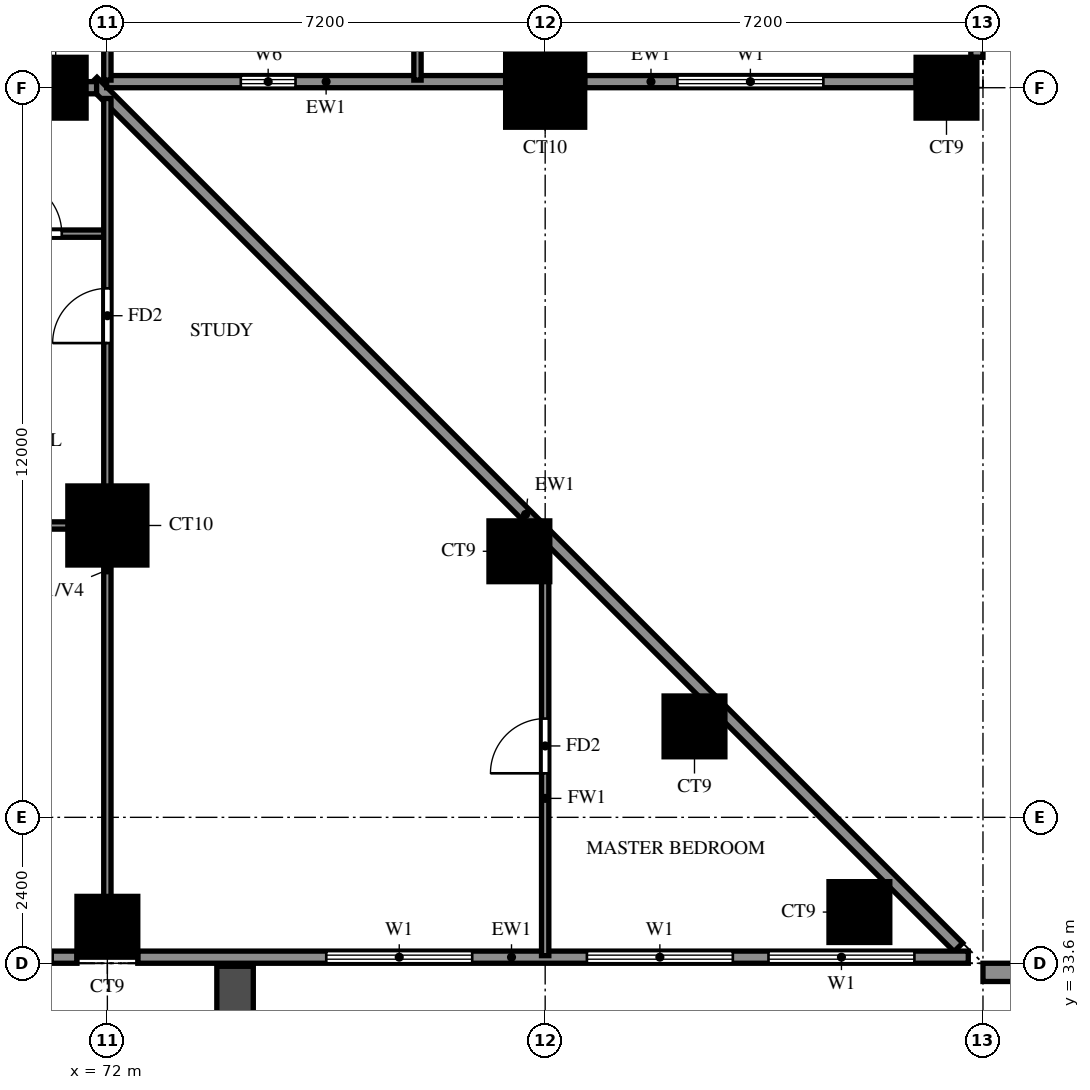
"""IFC4 building model, lengths in metres.
Left out: names, types, materials, properties, quantities, classifications, styles, units other than length and angle.
Written with IfcOpenShell. Run it as: python <this file> out.ifc"""

import sys

from ifc_helpers import new_model, si_unit, direction, frame, frame_2d, origin, origin_2d, place, context, subcontext, project, spatial, rectangle, extrude, source, transform, mapped, element, fill, save


model = new_model("IFC4")
c1 = context("Model", 3, precision=1e-05, world=origin(), true_north=direction((0.0, 1.0)))
c2 = subcontext(c1, "Body", "Model", "MODEL_VIEW")
j1 = project(units=[si_unit("LENGTHUNIT", "METRE"), si_unit("PLANEANGLEUNIT", "RADIAN")], contexts=[c1])
p1 = place(None, origin())
s1 = spatial("IfcSite", under=j1, at=p1, CompositionType="ELEMENT")
p2 = place(p1, origin())
s2 = spatial("IfcBuilding", under=s1, at=p2, CompositionType="ELEMENT")
p3 = place(p2, frame((0.0, 0.0, 90.0)))
s3 = spatial("IfcBuildingStorey", under=s2, at=p3, CompositionType="ELEMENT", Elevation=90.0)
m1 = source(origin(), c2, "Body", "SweptSolid", [
    extrude(rectangle(XDim=1.0, YDim=1.0, at=origin_2d()), origin(), (0.0, 0.0, 1.0), 3.18),
])
for number, where, z_axis, x_axis in (
    (1, (72.0, 34.2, 0.0), (0.0, 0.0, 1.0), (1.0, 0.0, 0.0)),
    (2, (84.367, 34.442, 0.0), (0.0, 0.0, 1.0), (1.0, 0.0, 0.0)),
    (3, (81.656, 37.496, 0.0), (0.0, 0.0, 1.0), (1.0, 0.0, 0.0)),
    (4, (78.776, 40.376, 0.0), (0.0, 0.0, 1.0), (1.0, 0.0, 0.0)),
):
    element("IfcColumn", number, at=place(p3, frame(where, z_axis=z_axis, x_axis=x_axis)), inside=s3, PredefinedType="COLUMN", context=c2, shape_type="MappedRepresentation", body=[
        mapped(m1, transform((0.0, 0.0, 0.0))),
    ])
m2 = source(origin(), c2, "Body", "SweptSolid", [
    extrude(rectangle(XDim=1.3, YDim=1.3, at=origin_2d()), origin(), (0.0, 0.0, 1.0), 3.18),
])
p4 = place(p3, frame((72.0, 40.8, 0.0), z_axis=(0.0, 0.0, 1.0), x_axis=(1.0, 0.0, 0.0)))
e5 = element("IfcColumn", 5, at=p4, inside=s3, PredefinedType="COLUMN", context=c2, shape_type="MappedRepresentation", body=[
    mapped(m2, transform((0.0, 0.0, 0.0))),
])
p5 = place(p3, frame((71.15, 48.0, 0.0), z_axis=(0.0, 0.0, 1.0), x_axis=(1.0, 0.0, 0.0)))
e6 = element("IfcColumn", 6, at=p5, inside=s3, PredefinedType="COLUMN", context=c2, shape_type="MappedRepresentation", body=[
    mapped(m1, transform((0.0, 0.0, 0.0))),
])
p6 = place(p3, frame((79.2, 48.0, 0.0), z_axis=(0.0, 0.0, 1.0), x_axis=(1.0, 0.0, 0.0)))
e7 = element("IfcColumn", 7, at=p6, inside=s3, PredefinedType="COLUMN", context=c2, shape_type="MappedRepresentation", body=[
    mapped(m2, transform((0.0, 0.0, 0.0))),
])
p7 = place(p3, frame((85.8, 48.0, 0.0), z_axis=(0.0, 0.0, 1.0), x_axis=(1.0, 0.0, 0.0)))
e8 = element("IfcColumn", 8, at=p7, inside=s3, PredefinedType="COLUMN", context=c2, shape_type="MappedRepresentation", body=[
    mapped(m1, transform((0.0, 0.0, 0.0))),
])
p8 = place(p3, frame((85.996, 33.863, 0.0), z_axis=(0.0, 0.0, 1.0), x_axis=(-0.707100718496, 0.707112843825, 0.0)))
e9 = element("IfcWall", 9, at=p8, inside=s3, PredefinedType="SOLIDWALL", context=c2, shape_type="SweptSolid", body=[
    extrude(rectangle(XDim=20.135, YDim=0.2, at=frame_2d((10.067, 0.0))), origin(), (0.0, 0.0, 1.0), 3.18),
])
p9 = place(p3, frame((71.989, 48.1, 0.0), z_axis=(0.0, 0.0, 1.0), x_axis=(1.0, 0.0, 0.0)))
e10 = element("IfcWall", 10, at=p9, inside=s3, PredefinedType="SOLIDWALL", context=c2, shape_type="SweptSolid", body=[
    extrude(rectangle(XDim=6.562, YDim=0.2, at=frame_2d((3.281, 0.0))), origin(), (0.0, 0.0, 1.0), 3.18),
])
p10 = place(p9, frame((2.206, 0.0, 1.5)))
e11 = element("IfcOpeningElement", 11, at=p10, cuts=e10, PredefinedType="OPENING", context=c2, shape_type="SweptSolid", body=[
    extrude(rectangle(XDim=0.9, YDim=0.9, at=frame_2d((0.45, 0.45))), frame((0.0, 0.11, 0.0), z_axis=(0.0, -1.0, 0.0), x_axis=(1.0, 0.0, 0.0)), (0.0, 0.0, 1.0), 0.22),
])
p11 = place(p3, frame((79.85, 48.1, 0.0), z_axis=(0.0, 0.0, 1.0), x_axis=(1.0, 0.0, 0.0)))
e12 = element("IfcWall", 12, at=p11, inside=s3, PredefinedType="SOLIDWALL", context=c2, shape_type="SweptSolid", body=[
    extrude(rectangle(XDim=5.45, YDim=0.2, at=frame_2d((2.725, 0.0))), origin(), (0.0, 0.0, 1.0), 3.18),
])
p12 = place(p11, frame((1.525, 0.0, 0.6)))
e13 = element("IfcOpeningElement", 13, at=p12, cuts=e12, PredefinedType="OPENING", context=c2, shape_type="SweptSolid", body=[
    extrude(rectangle(XDim=2.4, YDim=2.4, at=frame_2d((1.2, 1.2))), frame((0.0, 0.11, 0.0), z_axis=(0.0, -1.0, 0.0), x_axis=(1.0, 0.0, 0.0)), (0.0, 0.0, 1.0), 0.22),
])
p13 = place(p3, frame((86.3, 48.5, 0.0), z_axis=(0.0, 0.0, 1.0), x_axis=(0.0, 1.0, 0.0)))
e14 = element("IfcWall", 14, at=p13, inside=s3, PredefinedType="SOLIDWALL", context=c2, shape_type="SweptSolid", body=[
    extrude(rectangle(XDim=6.2, YDim=0.2, at=frame_2d((3.1, 0.0))), origin(), (0.0, 0.0, 1.0), 3.18),
])
p14 = place(p13, frame((1.05, 0.0, 0.6)))
e15 = element("IfcOpeningElement", 15, at=p14, cuts=e14, PredefinedType="OPENING", context=c2, shape_type="SweptSolid", body=[
    extrude(rectangle(XDim=2.4, YDim=2.4, at=frame_2d((1.2, 1.2))), frame((0.0, 0.11, 0.0), z_axis=(0.0, -1.0, 0.0), x_axis=(1.0, 0.0, 0.0)), (0.0, 0.0, 1.0), 0.22),
])
p15 = place(p13, frame((5.0, 0.0, 0.6)))
e16 = element("IfcOpeningElement", 16, at=p15, cuts=e14, PredefinedType="OPENING", context=c2, shape_type="SweptSolid", body=[
    extrude(rectangle(XDim=0.9, YDim=2.4, at=frame_2d((0.45, 1.2))), frame((0.0, 0.11, 0.0), z_axis=(0.0, -1.0, 0.0), x_axis=(1.0, 0.0, 0.0)), (0.0, 0.0, 1.0), 0.22),
])
p16 = place(p3, frame((65.3, 33.7, 0.0), z_axis=(0.0, 0.0, 1.0), x_axis=(1.0, 0.0, 0.0)))
e17 = element("IfcWall", 17, at=p16, inside=s3, PredefinedType="SOLIDWALL", context=c2, shape_type="SweptSolid", body=[
    extrude(rectangle(XDim=6.2, YDim=0.2, at=frame_2d((3.1, 0.0))), origin(), (0.0, 0.0, 1.0), 3.18),
])
p17 = place(p16, frame((4.0, 0.0, 0.0)))
e18 = element("IfcOpeningElement", 18, at=p17, cuts=e17, PredefinedType="OPENING", context=c2, shape_type="SweptSolid", body=[
    extrude(rectangle(XDim=1.8, YDim=2.4, at=frame_2d((0.9, 1.2))), frame((0.0, 0.11, 0.0), z_axis=(0.0, -1.0, 0.0), x_axis=(1.0, 0.0, 0.0)), (0.0, 0.0, 1.0), 0.22),
])
p18 = place(p16, frame((0.45, 0.0, 0.6)))
e19 = element("IfcOpeningElement", 19, at=p18, cuts=e17, PredefinedType="OPENING", context=c2, shape_type="SweptSolid", body=[
    extrude(rectangle(XDim=1.2, YDim=2.4, at=frame_2d((0.6, 1.2))), frame((0.0, 0.11, 0.0), z_axis=(0.0, -1.0, 0.0), x_axis=(1.0, 0.0, 0.0)), (0.0, 0.0, 1.0), 0.22),
])
p19 = place(p16, frame((2.65, 0.0, 0.6)))
e20 = element("IfcOpeningElement", 20, at=p19, cuts=e17, PredefinedType="OPENING", context=c2, shape_type="SweptSolid", body=[
    extrude(rectangle(XDim=0.9, YDim=2.4, at=frame_2d((0.45, 1.2))), frame((0.0, 0.11, 0.0), z_axis=(0.0, -1.0, 0.0), x_axis=(1.0, 0.0, 0.0)), (0.0, 0.0, 1.0), 0.22),
])
p20 = place(p3, frame((72.5, 33.7, 0.0), z_axis=(0.0, 0.0, 1.0), x_axis=(1.0, 0.0, 0.0)))
e21 = element("IfcWall", 21, at=p20, inside=s3, PredefinedType="SOLIDWALL", context=c2, shape_type="SweptSolid", body=[
    extrude(rectangle(XDim=13.659, YDim=0.2, at=frame_2d((6.829, 0.0))), origin(), (0.0, 0.0, 1.0), 3.18),
])
p21 = place(p20, frame((3.1, 0.0, 0.6)))
e22 = element("IfcOpeningElement", 22, at=p21, cuts=e21, PredefinedType="OPENING", context=c2, shape_type="SweptSolid", body=[
    extrude(rectangle(XDim=2.4, YDim=2.4, at=frame_2d((1.2, 1.2))), frame((0.0, 0.11, 0.0), z_axis=(0.0, -1.0, 0.0), x_axis=(1.0, 0.0, 0.0)), (0.0, 0.0, 1.0), 0.22),
])
p22 = place(p20, frame((7.386, 0.0, 0.6)))
e23 = element("IfcOpeningElement", 23, at=p22, cuts=e21, PredefinedType="OPENING", context=c2, shape_type="SweptSolid", body=[
    extrude(rectangle(XDim=2.4, YDim=2.4, at=frame_2d((1.2, 1.2))), frame((0.0, 0.11, 0.0), z_axis=(0.0, -1.0, 0.0), x_axis=(1.0, 0.0, 0.0)), (0.0, 0.0, 1.0), 0.22),
])
p23 = place(p20, frame((10.372, 0.0, 0.6)))
e24 = element("IfcOpeningElement", 24, at=p23, cuts=e21, PredefinedType="OPENING", context=c2, shape_type="SweptSolid", body=[
    extrude(rectangle(XDim=2.4, YDim=2.4, at=frame_2d((1.2, 1.2))), frame((0.0, 0.11, 0.0), z_axis=(0.0, -1.0, 0.0), x_axis=(1.0, 0.0, 0.0)), (0.0, 0.0, 1.0), 0.22),
])
p24 = place(p3, frame((86.4, 33.45, -0.32), z_axis=(0.0, 0.0, 1.0), x_axis=(1.0, 0.0, 0.0)))
e25 = element("IfcWall", 25, at=p24, inside=s3, PredefinedType="SOLIDWALL", context=c2, shape_type="SweptSolid", body=[
    extrude(rectangle(XDim=2.4, YDim=0.3, at=frame_2d((1.2, 0.0))), origin(), (0.0, 0.0, 1.0), 3.5),
])
p25 = place(p3, frame((74.1, 33.55, 0.0), z_axis=(0.0, 0.0, 1.0), x_axis=(0.0, -1.0, 0.0)))
e26 = element("IfcWall", 26, at=p25, inside=s3, PredefinedType="SOLIDWALL", context=c2, shape_type="SweptSolid", body=[
    extrude(rectangle(XDim=2.65, YDim=0.6, at=frame_2d((1.325, 0.0))), origin(), (0.0, 0.0, 1.0), 2.85),
])
p26 = place(p3, frame((67.2, 48.0, 0.0), z_axis=(0.0, 0.0, 1.0), x_axis=(1.0, 0.0, 0.0)))
e27 = element("IfcWall", 27, at=p26, inside=s3, PredefinedType="SOLIDWALL", context=c2, shape_type="SweptSolid", body=[
    extrude(rectangle(XDim=4.623, YDim=0.2, at=frame_2d((2.312, 0.0))), origin(), (0.0, 0.0, 1.0), 3.18),
])
p27 = place(p3, frame((60.0, 40.8, 0.0), z_axis=(0.0, 0.0, 1.0), x_axis=(1.0, 0.0, 0.0)))
e28 = element("IfcWall", 28, at=p27, inside=s3, PredefinedType="PARTITIONING", context=c2, shape_type="SweptSolid", body=[
    extrude(rectangle(XDim=12.0, YDim=0.12, at=frame_2d((6.0, 0.0))), origin(), (0.0, 0.0, 1.0), 3.18),
])
p28 = place(p27, frame((7.65, 0.0, 0.0)))
e29 = element("IfcOpeningElement", 29, at=p28, cuts=e28, PredefinedType="OPENING", context=c2, shape_type="SweptSolid", body=[
    extrude(rectangle(XDim=1.5, YDim=2.1, at=frame_2d((0.75, 1.05))), frame((0.0, 0.07, 0.0), z_axis=(0.0, -1.0, 0.0), x_axis=(1.0, 0.0, 0.0)), (0.0, 0.0, 1.0), 0.14),
])
p29 = place(p27, frame((1.95, 0.0, 0.0)))
e30 = element("IfcOpeningElement", 30, at=p29, cuts=e28, PredefinedType="OPENING", context=c2, shape_type="SweptSolid", body=[
    extrude(rectangle(XDim=0.9, YDim=2.1, at=frame_2d((0.45, 1.05))), frame((0.0, 0.07, 0.0), z_axis=(0.0, -1.0, 0.0), x_axis=(1.0, 0.0, 0.0)), (0.0, 0.0, 1.0), 0.14),
])
p30 = place(p3, frame((67.2, 45.6, 0.0), z_axis=(0.0, 0.0, 1.0), x_axis=(1.0, 0.0, 0.0)))
e31 = element("IfcWall", 31, at=p30, inside=s3, PredefinedType="PARTITIONING", context=c2, shape_type="SweptSolid", body=[
    extrude(rectangle(XDim=4.8, YDim=0.12, at=frame_2d((2.4, 0.0))), origin(), (0.0, 0.0, 1.0), 3.18),
])
p31 = place(p30, frame((3.15, 0.0, 0.0)))
e32 = element("IfcOpeningElement", 32, at=p31, cuts=e31, PredefinedType="OPENING", context=c2, shape_type="SweptSolid", body=[
    extrude(rectangle(XDim=0.9, YDim=2.1, at=frame_2d((0.45, 1.05))), frame((0.0, 0.07, 0.0), z_axis=(0.0, -1.0, 0.0), x_axis=(1.0, 0.0, 0.0)), (0.0, 0.0, 1.0), 0.14),
])
p32 = place(p3, frame((72.0, 33.725, 0.0), z_axis=(0.0, 0.0, 1.0), x_axis=(0.0, 1.0, 0.0)))
e33 = element("IfcWall", 33, at=p32, inside=s3, PredefinedType="PARTITIONING", context=c2, shape_type="SweptSolid", body=[
    extrude(rectangle(XDim=14.098, YDim=0.12, at=frame_2d((7.049, 0.0))), origin(), (0.0, 0.0, 1.0), 2.28),
])
p33 = place(p32, frame((10.075, 0.0, 0.0)))
e34 = element("IfcOpeningElement", 34, at=p33, cuts=e33, PredefinedType="OPENING", context=c2, shape_type="SweptSolid", body=[
    extrude(rectangle(XDim=0.9, YDim=2.1, at=frame_2d((0.45, 1.05))), frame((0.0, 0.07, 0.0), z_axis=(0.0, -1.0, 0.0), x_axis=(1.0, 0.0, 0.0)), (0.0, 0.0, 1.0), 0.14),
])
for number, where, z_axis, x_axis in (
    (35, (72.0, 48.125, 0.0), (0.0, 0.0, 1.0), (0.0, 1.0, 0.0)),
    (36, (77.1, 48.125, 0.0), (0.0, 0.0, 1.0), (0.0, 1.0, 0.0)),
):
    element("IfcWall", number, at=place(p3, frame(where, z_axis=z_axis, x_axis=x_axis)), inside=s3, PredefinedType="PARTITIONING", context=c2, shape_type="SweptSolid", body=[
        extrude(rectangle(XDim=3.475, YDim=0.12, at=frame_2d((1.738, 0.0))), origin(), (0.0, 0.0, 1.0), 3.18),
    ])
p34 = place(p3, frame((79.2, 33.725, 0.0), z_axis=(0.0, 0.0, 1.0), x_axis=(0.0, 1.0, 0.0)))
e37 = element("IfcWall", 37, at=p34, inside=s3, PredefinedType="PARTITIONING", context=c2, shape_type="SweptSolid", body=[
    extrude(rectangle(XDim=6.898, YDim=0.12, at=frame_2d((3.449, 0.0))), origin(), (0.0, 0.0, 1.0), 3.18),
])
p35 = place(p34, frame((2.999, 0.0, 0.0)))
e38 = element("IfcOpeningElement", 38, at=p35, cuts=e37, PredefinedType="OPENING", context=c2, shape_type="SweptSolid", body=[
    extrude(rectangle(XDim=0.9, YDim=2.1, at=frame_2d((0.45, 1.05))), frame((0.0, 0.07, 0.0), z_axis=(0.0, -1.0, 0.0), x_axis=(1.0, 0.0, 0.0)), (0.0, 0.0, 1.0), 0.14),
])
p36 = place(p3, frame((79.2, 48.125, 0.0), z_axis=(0.0, 0.0, 1.0), x_axis=(0.0, 1.0, 0.0)))
e39 = element("IfcWall", 39, at=p36, inside=s3, PredefinedType="PARTITIONING", context=c2, shape_type="SweptSolid", body=[
    extrude(rectangle(XDim=21.475, YDim=0.12, at=frame_2d((10.738, 0.0))), origin(), (0.0, 0.0, 1.0), 3.18),
])
p37 = place(p36, frame((2.788, 0.0, 0.0)))
e40 = element("IfcOpeningElement", 40, at=p37, cuts=e39, PredefinedType="OPENING", context=c2, shape_type="SweptSolid", body=[
    extrude(rectangle(XDim=1.5, YDim=2.1, at=frame_2d((0.75, 1.05))), frame((0.0, 0.07, 0.0), z_axis=(0.0, -1.0, 0.0), x_axis=(1.0, 0.0, 0.0)), (0.0, 0.0, 1.0), 0.14),
])
p38 = place(p36, frame((8.425, 0.0, 0.0)))
e41 = element("IfcOpeningElement", 41, at=p38, cuts=e39, PredefinedType="OPENING", context=c2, shape_type="SweptSolid", body=[
    extrude(rectangle(XDim=0.9, YDim=2.1, at=frame_2d((0.45, 1.05))), frame((0.0, 0.07, 0.0), z_axis=(0.0, -1.0, 0.0), x_axis=(1.0, 0.0, 0.0)), (0.0, 0.0, 1.0), 0.14),
])
p39 = place(p36, frame((12.025, 0.0, 0.0)))
e42 = element("IfcOpeningElement", 42, at=p39, cuts=e39, PredefinedType="OPENING", context=c2, shape_type="SweptSolid", body=[
    extrude(rectangle(XDim=0.9, YDim=2.1, at=frame_2d((0.45, 1.05))), frame((0.0, 0.07, 0.0), z_axis=(0.0, -1.0, 0.0), x_axis=(1.0, 0.0, 0.0)), (0.0, 0.0, 1.0), 0.14),
])
p40 = place(p36, frame((17.425, 0.0, 0.0)))
e43 = element("IfcOpeningElement", 43, at=p40, cuts=e39, PredefinedType="OPENING", context=c2, shape_type="SweptSolid", body=[
    extrude(rectangle(XDim=0.9, YDim=2.1, at=frame_2d((0.45, 1.05))), frame((0.0, 0.07, 0.0), z_axis=(0.0, -1.0, 0.0), x_axis=(1.0, 0.0, 0.0)), (0.0, 0.0, 1.0), 0.14),
])
p41 = place(p10, origin())
e44 = element("IfcWindow", 44, at=p41, inside=s3, PartitioningType="SINGLE_PANEL", PredefinedType="WINDOW", context=c2, shape_type="SweptSolid", body=[
    extrude(rectangle(XDim=0.9, YDim=0.9, at=frame_2d((0.45, 0.45))), frame((0.0, 0.03, 0.0), z_axis=(0.0, -1.0, 0.0), x_axis=(1.0, 0.0, 0.0)), (0.0, 0.0, 1.0), 0.06),
])
fill(e11, e44)
p42 = place(p12, origin())
e45 = element("IfcWindow", 45, at=p42, inside=s3, PartitioningType="DOUBLE_PANEL_VERTICAL", PredefinedType="WINDOW", context=c2, shape_type="SweptSolid", body=[
    extrude(rectangle(XDim=2.4, YDim=2.4, at=frame_2d((1.2, 1.2))), frame((0.0, 0.03, 0.0), z_axis=(0.0, -1.0, 0.0), x_axis=(1.0, 0.0, 0.0)), (0.0, 0.0, 1.0), 0.06),
])
fill(e13, e45)
p43 = place(p21, origin())
e46 = element("IfcWindow", 46, at=p43, inside=s3, PartitioningType="DOUBLE_PANEL_VERTICAL", PredefinedType="WINDOW", context=c2, shape_type="SweptSolid", body=[
    extrude(rectangle(XDim=2.4, YDim=2.4, at=frame_2d((1.2, 1.2))), frame((0.0, 0.03, 0.0), z_axis=(0.0, -1.0, 0.0), x_axis=(1.0, 0.0, 0.0)), (0.0, 0.0, 1.0), 0.06),
])
fill(e22, e46)
p44 = place(p22, origin())
e47 = element("IfcWindow", 47, at=p44, inside=s3, PartitioningType="DOUBLE_PANEL_VERTICAL", PredefinedType="WINDOW", context=c2, shape_type="SweptSolid", body=[
    extrude(rectangle(XDim=2.4, YDim=2.4, at=frame_2d((1.2, 1.2))), frame((0.0, 0.03, 0.0), z_axis=(0.0, -1.0, 0.0), x_axis=(1.0, 0.0, 0.0)), (0.0, 0.0, 1.0), 0.06),
])
fill(e23, e47)
p45 = place(p23, origin())
e48 = element("IfcWindow", 48, at=p45, inside=s3, PartitioningType="DOUBLE_PANEL_VERTICAL", PredefinedType="WINDOW", context=c2, shape_type="SweptSolid", body=[
    extrude(rectangle(XDim=2.4, YDim=2.4, at=frame_2d((1.2, 1.2))), frame((0.0, 0.03, 0.0), z_axis=(0.0, -1.0, 0.0), x_axis=(1.0, 0.0, 0.0)), (0.0, 0.0, 1.0), 0.06),
])
fill(e24, e48)
p46 = place(p31, origin())
e49 = element("IfcDoor", 49, at=p46, inside=s3, OperationType="SINGLE_SWING_LEFT", PredefinedType="DOOR", context=c2, shape_type="SweptSolid", body=[
    extrude(rectangle(XDim=0.9, YDim=2.1, at=frame_2d((0.45, 1.05))), frame((0.0, 0.025, 0.0), z_axis=(0.0, -1.0, 0.0), x_axis=(1.0, 0.0, 0.0)), (0.0, 0.0, 1.0), 0.05),
])
fill(e32, e49)
p47 = place(p33, origin())
e50 = element("IfcDoor", 50, at=p47, inside=s3, OperationType="SINGLE_SWING_LEFT", PredefinedType="DOOR", context=c2, shape_type="SweptSolid", body=[
    extrude(rectangle(XDim=0.9, YDim=2.1, at=frame_2d((0.45, 1.05))), frame((0.0, 0.025, 0.0), z_axis=(0.0, -1.0, 0.0), x_axis=(1.0, 0.0, 0.0)), (0.0, 0.0, 1.0), 0.05),
])
fill(e34, e50)
p48 = place(p35, origin())
e51 = element("IfcDoor", 51, at=p48, inside=s3, OperationType="SINGLE_SWING_RIGHT", PredefinedType="DOOR", context=c2, shape_type="SweptSolid", body=[
    extrude(rectangle(XDim=0.9, YDim=2.1, at=frame_2d((0.45, 1.05))), frame((0.0, 0.025, 0.0), z_axis=(0.0, -1.0, 0.0), x_axis=(1.0, 0.0, 0.0)), (0.0, 0.0, 1.0), 0.05),
])
fill(e38, e51)
save(model, sys.argv[1])
